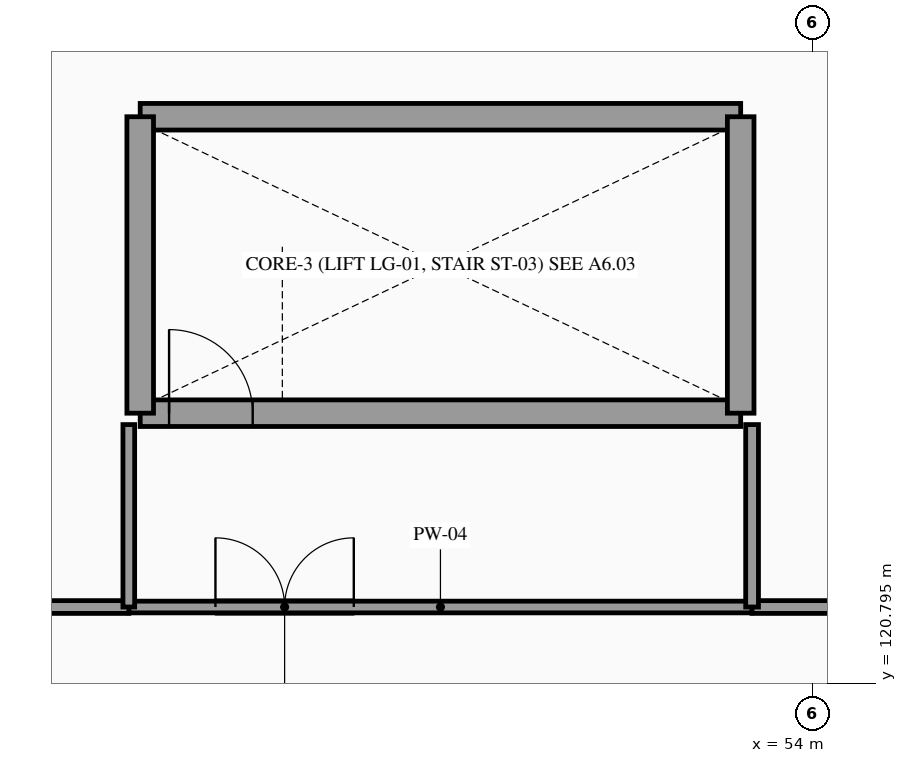
"""IFC4 building model, lengths in metres.
Left out: names, types, materials, properties, quantities, classifications, styles, units other than length and angle.
Written with IfcOpenShell. Run it as: python <this file> out.ifc"""

import sys

from ifc_helpers import new_model, si_unit, direction, frame, frame_2d, origin, place, context, subcontext, project, spatial, rectangle, extrude, element, fill, save


model = new_model("IFC4")
c1 = context("Model", 3, precision=1e-05, world=origin(), true_north=direction((0.0, 1.0)))
c2 = subcontext(c1, "Body", "Model", "MODEL_VIEW")
j1 = project(units=[si_unit("LENGTHUNIT", "METRE"), si_unit("PLANEANGLEUNIT", "RADIAN")], contexts=[c1])
p1 = place(None, origin())
s1 = spatial("IfcSite", under=j1, at=p1, CompositionType="ELEMENT")
p2 = place(p1, origin())
s2 = spatial("IfcBuilding", under=s1, at=p2, CompositionType="ELEMENT")
p3 = place(p2, frame((0.0, 0.0, 5.4)))
s3 = spatial("IfcBuildingStorey", under=s2, at=p3, CompositionType="ELEMENT", Elevation=5.4)
p4 = place(p3, frame((45.15, 124.35, 0.0), z_axis=(0.0, 0.0, 1.0), x_axis=(1.0, 0.0, 0.0)))
e1 = element("IfcWall", 1, at=p4, inside=s3, PredefinedType="SHEAR", context=c2, shape_type="SweptSolid", body=[
    extrude(rectangle(XDim=7.9, YDim=0.35, at=frame_2d((3.95, 0.0))), origin(), (0.0, 0.0, 1.0), 4.68),
])
p5 = place(p4, frame((0.38, 0.0, 0.0)))
e2 = element("IfcOpeningElement", 2, at=p5, cuts=e1, PredefinedType="OPENING", context=c2, shape_type="SweptSolid", body=[
    extrude(rectangle(XDim=1.1, YDim=2.2, at=frame_2d((0.55, 1.1))), frame((0.0, 0.185, 0.0), z_axis=(0.0, -1.0, 0.0), x_axis=(1.0, 0.0, 0.0)), (0.0, 0.0, 1.0), 0.37),
])
p6 = place(p3, frame((45.15, 128.25, 0.0), z_axis=(0.0, 0.0, 1.0), x_axis=(1.0, 0.0, 0.0)))
e3 = element("IfcWall", 3, at=p6, inside=s3, PredefinedType="SHEAR", context=c2, shape_type="SweptSolid", body=[
    extrude(rectangle(XDim=7.9, YDim=0.35, at=frame_2d((3.95, 0.0))), origin(), (0.0, 0.0, 1.0), 4.68),
])
for number, where, z_axis, x_axis in (
    (4, (45.15, 124.35, 0.0), (0.0, 0.0, 1.0), (0.0, 1.0, 0.0)),
    (5, (53.05, 124.35, 0.0), (0.0, 0.0, 1.0), (0.0, 1.0, 0.0)),
):
    element("IfcWall", number, at=place(p3, frame(where, z_axis=z_axis, x_axis=x_axis)), inside=s3, PredefinedType="SHEAR", context=c2, shape_type="SweptSolid", body=[
        extrude(rectangle(XDim=3.9, YDim=0.35, at=frame_2d((1.95, 0.0))), origin(), (0.0, 0.0, 1.0), 4.68),
    ])
p7 = place(p3, frame((45.0, 121.8, 0.0), z_axis=(0.0, 0.0, 1.0), x_axis=(1.0, 0.0, 0.0)))
e6 = element("IfcWall", 6, at=p7, inside=s3, PredefinedType="PARTITIONING", context=c2, shape_type="SweptSolid", body=[
    extrude(rectangle(XDim=8.2, YDim=0.154, at=frame_2d((4.1, 0.0))), origin(), (0.0, 0.0, 1.0), 3.23),
])
p8 = place(p7, frame((1.14, 0.0, 0.0)))
e7 = element("IfcOpeningElement", 7, at=p8, cuts=e6, PredefinedType="OPENING", context=c2, shape_type="SweptSolid", body=[
    extrude(rectangle(XDim=1.82, YDim=2.25, at=frame_2d((0.91, 1.125))), frame((0.0, 0.087, 0.0), z_axis=(0.0, -1.0, 0.0), x_axis=(1.0, 0.0, 0.0)), (0.0, 0.0, 1.0), 0.174),
])
p9 = place(p3, frame((43.2, 121.8, 0.0), z_axis=(0.0, 0.0, 1.0), x_axis=(1.0, 0.0, 0.0)))
e8 = element("IfcWall", 8, at=p9, inside=s3, PredefinedType="PARTITIONING", context=c2, shape_type="SweptSolid", body=[
    extrude(rectangle(XDim=1.8, YDim=0.168, at=frame_2d((0.9, 0.0))), origin(), (0.0, 0.0, 1.0), 3.23),
])
p10 = place(p3, frame((45.0, 121.8, 0.0), z_axis=(0.0, 0.0, 1.0), x_axis=(0.0, 1.0, 0.0)))
e9 = element("IfcWall", 9, at=p10, inside=s3, PredefinedType="PARTITIONING", context=c2, shape_type="SweptSolid", body=[
    extrude(rectangle(XDim=2.4, YDim=0.154, at=frame_2d((1.2, 0.0))), origin(), (0.0, 0.0, 1.0), 3.23),
])
p11 = place(p3, frame((53.2, 121.8, 0.0), z_axis=(0.0, 0.0, 1.0), x_axis=(1.0, 0.0, 0.0)))
e10 = element("IfcWall", 10, at=p11, inside=s3, PredefinedType="PARTITIONING", context=c2, shape_type="SweptSolid", body=[
    extrude(rectangle(XDim=4.38, YDim=0.168, at=frame_2d((2.19, 0.0))), origin(), (0.0, 0.0, 1.0), 3.23),
])
p12 = place(p3, frame((53.2, 121.8, 0.0), z_axis=(0.0, 0.0, 1.0), x_axis=(0.0, 1.0, 0.0)))
e11 = element("IfcWall", 11, at=p12, inside=s3, PredefinedType="PARTITIONING", context=c2, shape_type="SweptSolid", body=[
    extrude(rectangle(XDim=2.4, YDim=0.168, at=frame_2d((1.2, 0.0))), origin(), (0.0, 0.0, 1.0), 3.23),
])
p13 = place(p5, frame((1.1, 0.0, 0.0), z_axis=(0.0, 0.0, 1.0), x_axis=(-1.0, 0.0, 0.0)))
e12 = element("IfcDoor", 12, at=p13, inside=s3, OperationType="SINGLE_SWING_LEFT", PredefinedType="DOOR", context=c2, shape_type="SweptSolid", body=[
    extrude(rectangle(XDim=1.1, YDim=2.2, at=frame_2d((0.55, 1.1))), frame((0.0, 0.025, 0.0), z_axis=(0.0, -1.0, 0.0), x_axis=(1.0, 0.0, 0.0)), (0.0, 0.0, 1.0), 0.05),
])
fill(e2, e12)
p14 = place(p8, origin())
e13 = element("IfcDoor", 13, at=p14, inside=s3, OperationType="DOUBLE_DOOR_SINGLE_SWING", PredefinedType="DOOR", context=c2, shape_type="SweptSolid", body=[
    extrude(rectangle(XDim=1.82, YDim=2.25, at=frame_2d((0.91, 1.125))), frame((0.0, 0.025, 0.0), z_axis=(0.0, -1.0, 0.0), x_axis=(1.0, 0.0, 0.0)), (0.0, 0.0, 1.0), 0.05),
])
fill(e7, e13)
save(model, sys.argv[1])
